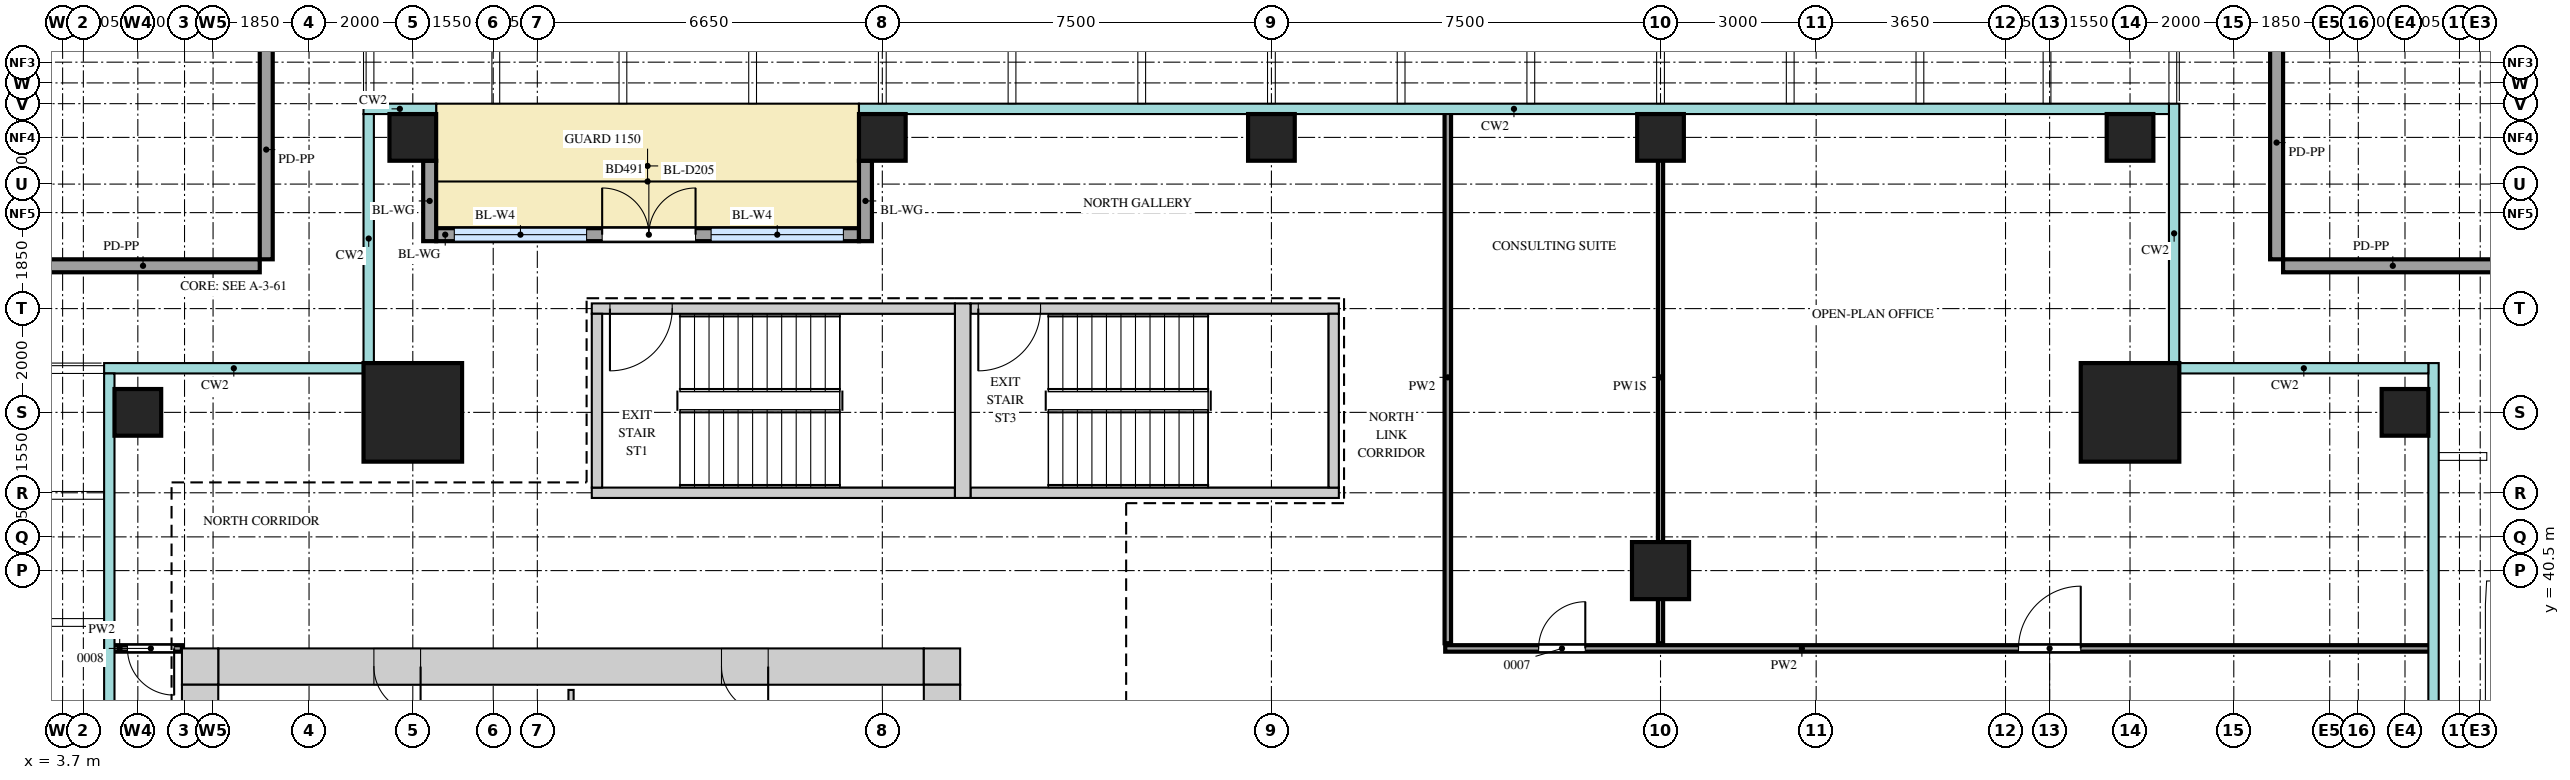
"""IFC4 building model, lengths in metres.
Left out: names, types, materials, properties, quantities, classifications, styles, units other than length and angle.
Written with IfcOpenShell. Run it as: python <this file> out.ifc"""

import sys

from ifc_helpers import new_model, si_unit, direction, frame, frame_2d, origin, origin_2d, place, context, subcontext, project, spatial, rectangle, extrude, source, transform, mapped, element, fill, save


model = new_model("IFC4")
c1 = context("Model", 3, precision=1e-05, world=origin(), true_north=direction((0.0, 1.0)))
c2 = subcontext(c1, "Body", "Model", "MODEL_VIEW")
j1 = project(units=[si_unit("LENGTHUNIT", "METRE"), si_unit("PLANEANGLEUNIT", "RADIAN")], contexts=[c1])
p1 = place(None, origin())
s1 = spatial("IfcSite", under=j1, at=p1, CompositionType="ELEMENT")
p2 = place(p1, origin())
s2 = spatial("IfcBuilding", under=s1, at=p2, CompositionType="ELEMENT")
p3 = place(p2, frame((0.0, 0.0, 222.2)))
s3 = spatial("IfcBuildingStorey", under=s2, at=p3, CompositionType="ELEMENT", Elevation=222.2)
m1 = source(origin(), c2, "Body", "SweptSolid", [
    extrude(rectangle(XDim=13.6, YDim=0.7, at=frame_2d((6.8, 0.0))), origin(), (0.0, 0.0, 1.0), 3.75),
])
p4 = place(p3, frame((6.7, 38.65, 0.0), z_axis=(0.0, 0.0, 1.0), x_axis=(1.0, 0.0, 0.0)))
e1 = element("IfcWall", 1, at=p4, inside=s3, PredefinedType="SHEAR", context=c2, shape_type="MappedRepresentation", body=[
    mapped(m1, transform((0.0, 0.0, 0.0))),
])
m2 = source(origin(), c2, "Body", "SweptSolid", [
    extrude(rectangle(XDim=0.9, YDim=2.1, at=frame_2d((0.45, 1.05))), frame((0.0, 0.36, 0.0), z_axis=(0.0, -1.0, 0.0), x_axis=(1.0, 0.0, 0.0)), (0.0, 0.0, 1.0), 0.72),
])
p5 = place(p4, frame((3.0, 0.0, 0.0)))
e2 = element("IfcOpeningElement", 2, at=p5, cuts=e1, PredefinedType="OPENING", context=c2, shape_type="MappedRepresentation", body=[
    mapped(m2, transform((0.0, 0.0, 0.0))),
])
p6 = place(p4, frame((9.7, 0.0, 0.0)))
e3 = element("IfcOpeningElement", 3, at=p6, cuts=e1, PredefinedType="OPENING", context=c2, shape_type="MappedRepresentation", body=[
    mapped(m2, transform((0.0, 0.0, 0.0))),
])
m3 = source(origin(), c2, "Body", "SweptSolid", [
    extrude(rectangle(XDim=0.7, YDim=0.7, at=frame_2d((0.35, 0.0))), origin(), (0.0, 0.0, 1.0), 3.75),
])
for number, where, z_axis, x_axis in (
    (4, (20.3, 38.65, 0.0), (0.0, 0.0, 1.0), (1.0, 0.0, 0.0)),
    (5, (6.0, 38.65, 0.0), (0.0, 0.0, 1.0), (1.0, 0.0, 0.0)),
):
    element("IfcWall", number, at=place(p3, frame(where, z_axis=z_axis, x_axis=x_axis)), inside=s3, PredefinedType="SHEAR", context=c2, shape_type="MappedRepresentation", body=[
        mapped(m3, transform((0.0, 0.0, 0.0))),
    ])
m4 = source(origin(), c2, "Body", "SweptSolid", [
    extrude(rectangle(XDim=22.6, YDim=0.7, at=frame_2d((11.3, 0.0))), origin(), (0.0, 0.0, 1.0), 3.75),
])
p7 = place(p3, frame((20.65, 15.7, 0.0), z_axis=(0.0, 0.0, 1.0), x_axis=(0.0, 1.0, 0.0)))
e6 = element("IfcWall", 6, at=p7, inside=s3, PredefinedType="SHEAR", context=c2, shape_type="MappedRepresentation", body=[
    mapped(m4, transform((0.0, 0.0, 0.0))),
])
m5 = source(origin(), c2, "Body", "SweptSolid", [
    extrude(rectangle(XDim=1.8, YDim=2.1, at=frame_2d((0.9, 1.05))), frame((0.0, 0.36, 0.0), z_axis=(0.0, -1.0, 0.0), x_axis=(1.0, 0.0, 0.0)), (0.0, 0.0, 1.0), 0.72),
])
p8 = place(p7, frame((10.8, 0.0, 0.0)))
e7 = element("IfcOpeningElement", 7, at=p8, cuts=e6, PredefinedType="OPENING", context=c2, shape_type="MappedRepresentation", body=[
    mapped(m5, transform((0.0, 0.0, 0.0))),
])
p9 = place(p7, frame((0.45, 0.0, 0.0)))
e8 = element("IfcOpeningElement", 8, at=p9, cuts=e6, PredefinedType="OPENING", context=c2, shape_type="MappedRepresentation", body=[
    mapped(m2, transform((0.0, 0.0, 0.0))),
])
p10 = place(p7, frame((2.9, 0.0, 0.0)))
e9 = element("IfcOpeningElement", 9, at=p10, cuts=e6, PredefinedType="OPENING", context=c2, shape_type="MappedRepresentation", body=[
    mapped(m2, transform((0.0, 0.0, 0.0))),
])
p11 = place(p7, frame((5.65, 0.0, 0.0)))
e10 = element("IfcOpeningElement", 10, at=p11, cuts=e6, PredefinedType="OPENING", context=c2, shape_type="MappedRepresentation", body=[
    mapped(m2, transform((0.0, 0.0, 0.0))),
])
p12 = place(p3, frame((6.35, 15.7, 0.0), z_axis=(0.0, 0.0, 1.0), x_axis=(0.0, 1.0, 0.0)))
e11 = element("IfcWall", 11, at=p12, inside=s3, PredefinedType="SHEAR", context=c2, shape_type="MappedRepresentation", body=[
    mapped(m4, transform((0.0, 0.0, 0.0))),
])
m6 = source(origin(), c2, "Body", "SweptSolid", [
    extrude(rectangle(XDim=7.0, YDim=0.2, at=frame_2d((3.5, 0.0))), origin(), (0.0, 0.0, 1.0), 3.75),
])
p13 = place(p3, frame((13.9, 45.55, 0.0), z_axis=(0.0, 0.0, 1.0), x_axis=(1.0, 0.0, 0.0)))
e12 = element("IfcWall", 12, at=p13, inside=s3, PredefinedType="SHEAR", context=c2, shape_type="MappedRepresentation", body=[
    mapped(m6, transform((0.0, 0.0, 0.0))),
])
m7 = source(origin(), c2, "Body", "SweptSolid", [
    extrude(rectangle(XDim=1.2, YDim=2.1, at=frame_2d((0.6, 1.05))), frame((0.0, 0.11, 0.0), z_axis=(0.0, -1.0, 0.0), x_axis=(1.0, 0.0, 0.0)), (0.0, 0.0, 1.0), 0.22),
])
p14 = place(p13, frame((0.35, 0.0, 0.0)))
e13 = element("IfcOpeningElement", 13, at=p14, cuts=e12, PredefinedType="OPENING", context=c2, shape_type="MappedRepresentation", body=[
    mapped(m7, transform((0.0, 0.0, 0.0))),
])
p15 = place(p3, frame((13.9, 42.0, 0.0), z_axis=(0.0, 0.0, 1.0), x_axis=(1.0, 0.0, 0.0)))
e14 = element("IfcWall", 14, at=p15, inside=s3, PredefinedType="SHEAR", context=c2, shape_type="MappedRepresentation", body=[
    mapped(m6, transform((0.0, 0.0, 0.0))),
])
m8 = source(origin(), c2, "Body", "SweptSolid", [
    extrude(rectangle(XDim=7.1, YDim=0.2, at=frame_2d((3.55, 0.0))), origin(), (0.0, 0.0, 1.0), 3.75),
])
p16 = place(p3, frame((21.2, 45.55, 0.0), z_axis=(0.0, 0.0, 1.0), x_axis=(1.0, 0.0, 0.0)))
e15 = element("IfcWall", 15, at=p16, inside=s3, PredefinedType="SHEAR", context=c2, shape_type="MappedRepresentation", body=[
    mapped(m8, transform((0.0, 0.0, 0.0))),
])
p17 = place(p16, frame((0.15, 0.0, 0.0)))
e16 = element("IfcOpeningElement", 16, at=p17, cuts=e15, PredefinedType="OPENING", context=c2, shape_type="MappedRepresentation", body=[
    mapped(m7, transform((0.0, 0.0, 0.0))),
])
p18 = place(p3, frame((21.2, 42.0, 0.0), z_axis=(0.0, 0.0, 1.0), x_axis=(1.0, 0.0, 0.0)))
e17 = element("IfcWall", 17, at=p18, inside=s3, PredefinedType="SHEAR", context=c2, shape_type="MappedRepresentation", body=[
    mapped(m8, transform((0.0, 0.0, 0.0))),
])
m9 = source(origin(), c2, "Body", "SweptSolid", [
    extrude(rectangle(XDim=3.75, YDim=0.3, at=frame_2d((1.875, 0.0))), origin(), (0.0, 0.0, 1.0), 3.75),
])
p19 = place(p3, frame((21.05, 41.9, 0.0), z_axis=(0.0, 0.0, 1.0), x_axis=(0.0, 1.0, 0.0)))
e18 = element("IfcWall", 18, at=p19, inside=s3, PredefinedType="SHEAR", context=c2, shape_type="MappedRepresentation", body=[
    mapped(m9, transform((0.0, 0.0, 0.0))),
])
m10 = source(origin(), c2, "Body", "SweptSolid", [
    extrude(rectangle(XDim=3.35, YDim=0.2, at=frame_2d((1.675, 0.0))), origin(), (0.0, 0.0, 1.0), 3.75),
])
for number, where, z_axis, x_axis in (
    (19, (14.0, 42.1, 0.0), (0.0, 0.0, 1.0), (0.0, 1.0, 0.0)),
    (20, (28.2, 42.1, 0.0), (0.0, 0.0, 1.0), (0.0, 1.0, 0.0)),
):
    element("IfcWall", number, at=place(p3, frame(where, z_axis=z_axis, x_axis=x_axis)), inside=s3, PredefinedType="SHEAR", context=c2, shape_type="MappedRepresentation", body=[
        mapped(m10, transform((0.0, 0.0, 0.0))),
    ])
m11 = source(origin(), c2, "Body", "SweptSolid", [
    extrude(rectangle(XDim=1.9, YDim=1.9, at=origin_2d()), origin(), (0.0, 0.0, 1.0), 4.0),
])
for number, where, z_axis, x_axis in (
    (21, (43.55, 43.55, 0.0), (0.0, 0.0, 1.0), (1.0, 0.0, 0.0)),
    (22, (10.45, 43.55, 0.0), (0.0, 0.0, 1.0), (1.0, 0.0, 0.0)),
):
    element("IfcColumn", number, at=place(p3, frame(where, z_axis=z_axis, x_axis=x_axis)), inside=s3, PredefinedType="COLUMN", context=c2, shape_type="MappedRepresentation", body=[
        mapped(m11, transform((0.0, 0.0, 0.0))),
    ])
m12 = source(origin(), c2, "Body", "SweptSolid", [
    extrude(rectangle(XDim=0.9, YDim=0.9, at=origin_2d()), origin(), (0.0, 0.0, 1.0), 3.75),
])
for number, where, z_axis, x_axis in (
    (23, (48.85, 43.55, 0.0), (0.0, 0.0, 1.0), (1.0, 0.0, 0.0)),
    (24, (10.45, 48.85, 0.0), (0.0, 0.0, 1.0), (1.0, 0.0, 0.0)),
    (25, (19.5, 48.85, 0.0), (0.0, 0.0, 1.0), (1.0, 0.0, 0.0)),
    (26, (27.0, 48.85, 0.0), (0.0, 0.0, 1.0), (1.0, 0.0, 0.0)),
    (27, (34.5, 48.85, 0.0), (0.0, 0.0, 1.0), (1.0, 0.0, 0.0)),
    (28, (43.55, 48.85, 0.0), (0.0, 0.0, 1.0), (1.0, 0.0, 0.0)),
    (29, (5.15, 43.55, 0.0), (0.0, 0.0, 1.0), (1.0, 0.0, 0.0)),
):
    element("IfcColumn", number, at=place(p3, frame(where, z_axis=z_axis, x_axis=x_axis)), inside=s3, PredefinedType="COLUMN", context=c2, shape_type="MappedRepresentation", body=[
        mapped(m12, transform((0.0, 0.0, 0.0))),
    ])
m13 = source(origin(), c2, "Body", "SweptSolid", [
    extrude(rectangle(XDim=1.1, YDim=1.1, at=origin_2d()), origin(), (0.0, 0.0, 1.0), 3.75),
])
p20 = place(p3, frame((34.5, 40.5, 0.0), z_axis=(0.0, 0.0, 1.0), x_axis=(1.0, 0.0, 0.0)))
e30 = element("IfcColumn", 30, at=p20, inside=s3, PredefinedType="COLUMN", context=c2, shape_type="MappedRepresentation", body=[
    mapped(m13, transform((0.0, 0.0, 0.0))),
])
m14 = source(origin(), c2, "Body", "SweptSolid", [
    extrude(rectangle(XDim=8.15, YDim=0.25, at=frame_2d((4.075, 0.0))), origin(), (0.0, 0.0, 1.0), 3.35),
])
p21 = place(p3, frame((10.9, 46.975, 0.0), z_axis=(0.0, 0.0, 1.0), x_axis=(1.0, 0.0, 0.0)))
e31 = element("IfcWall", 31, at=p21, inside=s3, PredefinedType="SOLIDWALL", context=c2, shape_type="MappedRepresentation", body=[
    mapped(m14, transform((0.0, 0.0, 0.0))),
])
m15 = source(origin(), c2, "Body", "SweptSolid", [
    extrude(rectangle(XDim=2.55, YDim=2.4, at=frame_2d((1.275, 1.2))), frame((0.0, 0.135, 0.0), z_axis=(0.0, -1.0, 0.0), x_axis=(1.0, 0.0, 0.0)), (0.0, 0.0, 1.0), 0.27),
])
p22 = place(p21, frame((0.35, 0.0, 0.0)))
e32 = element("IfcOpeningElement", 32, at=p22, cuts=e31, PredefinedType="OPENING", context=c2, shape_type="MappedRepresentation", body=[
    mapped(m15, transform((0.0, 0.0, 0.0))),
])
p23 = place(p21, frame((5.3, 0.0, 0.0)))
e33 = element("IfcOpeningElement", 33, at=p23, cuts=e31, PredefinedType="OPENING", context=c2, shape_type="MappedRepresentation", body=[
    mapped(m15, transform((0.0, 0.0, 0.0))),
])
m16 = source(origin(), c2, "Body", "SweptSolid", [
    extrude(rectangle(XDim=1.8, YDim=2.4, at=frame_2d((0.9, 1.2))), frame((0.0, 0.135, 0.0), z_axis=(0.0, -1.0, 0.0), x_axis=(1.0, 0.0, 0.0)), (0.0, 0.0, 1.0), 0.27),
])
p24 = place(p21, frame((3.2, 0.0, 0.0)))
e34 = element("IfcOpeningElement", 34, at=p24, cuts=e31, PredefinedType="OPENING", context=c2, shape_type="MappedRepresentation", body=[
    mapped(m16, transform((0.0, 0.0, 0.0))),
])
m17 = source(origin(), c2, "Body", "SweptSolid", [
    extrude(rectangle(XDim=1.55, YDim=0.25, at=frame_2d((0.775, 0.0))), origin(), (0.0, 0.0, 1.0), 3.35),
])
for number, where, z_axis, x_axis in (
    (35, (10.775, 48.4, 0.0), (0.0, 0.0, 1.0), (0.0, -1.0, 0.0)),
    (36, (19.175, 48.4, 0.0), (0.0, 0.0, 1.0), (0.0, -1.0, 0.0)),
):
    element("IfcWall", number, at=place(p3, frame(where, z_axis=z_axis, x_axis=x_axis)), inside=s3, PredefinedType="SOLIDWALL", context=c2, shape_type="MappedRepresentation", body=[
        mapped(m17, transform((0.0, 0.0, 0.0))),
    ])
m18 = source(origin(), c2, "Body", "SweptSolid", [
    extrude(rectangle(XDim=4.23, YDim=0.25, at=frame_2d((2.115, 0.0))), origin(), (0.0, 0.0, 1.0), 1.1),
])
p25 = place(p3, frame((50.73, 46.375, 0.0), z_axis=(0.0, 0.0, 1.0), x_axis=(-1.0, 0.0, 0.0)))
e37 = element("IfcWall", 37, at=p25, inside=s3, PredefinedType="SOLIDWALL", context=c2, shape_type="MappedRepresentation", body=[
    mapped(m18, transform((0.0, 0.0, 0.0))),
])
m19 = source(origin(), c2, "Body", "SweptSolid", [
    extrude(rectangle(XDim=4.5, YDim=0.25, at=frame_2d((2.25, 0.0))), origin(), (0.0, 0.0, 1.0), 1.1),
])
p26 = place(p3, frame((46.375, 46.5, 0.0), z_axis=(0.0, 0.0, 1.0), x_axis=(0.0, 1.0, 0.0)))
e38 = element("IfcWall", 38, at=p26, inside=s3, PredefinedType="SOLIDWALL", context=c2, shape_type="MappedRepresentation", body=[
    mapped(m19, transform((0.0, 0.0, 0.0))),
])
p27 = place(p3, frame((7.625, 50.73, 0.0), z_axis=(0.0, 0.0, 1.0), x_axis=(0.0, -1.0, 0.0)))
e39 = element("IfcWall", 39, at=p27, inside=s3, PredefinedType="SOLIDWALL", context=c2, shape_type="MappedRepresentation", body=[
    mapped(m18, transform((0.0, 0.0, 0.0))),
])
p28 = place(p3, frame((7.5, 46.375, 0.0), z_axis=(0.0, 0.0, 1.0), x_axis=(-1.0, 0.0, 0.0)))
e40 = element("IfcWall", 40, at=p28, inside=s3, PredefinedType="SOLIDWALL", context=c2, shape_type="MappedRepresentation", body=[
    mapped(m19, transform((0.0, 0.0, 0.0))),
])
m20 = source(origin(), c2, "Body", "SweptSolid", [
    extrude(rectangle(XDim=6.0, YDim=0.1, at=frame_2d((3.0, 0.0))), origin(), (0.0, 0.0, 1.0), 3.8),
])
p29 = place(p3, frame((13.5, 32.2, 0.0), z_axis=(0.0, 0.0, 1.0), x_axis=(0.0, 1.0, 0.0)))
e41 = element("IfcWall", 41, at=p29, inside=s3, PredefinedType="PARTITIONING", context=c2, shape_type="MappedRepresentation", body=[
    mapped(m20, transform((0.0, 0.0, 0.0))),
])
m21 = source(origin(), c2, "Body", "SweptSolid", [
    extrude(rectangle(XDim=1.35, YDim=0.125, at=frame_2d((0.675, 0.0))), origin(), (0.0, 0.0, 1.0), 3.8),
])
p30 = place(p3, frame((4.65, 39.0, 0.0), z_axis=(0.0, 0.0, 1.0), x_axis=(1.0, 0.0, 0.0)))
e42 = element("IfcWall", 42, at=p30, inside=s3, PredefinedType="PARTITIONING", context=c2, shape_type="MappedRepresentation", body=[
    mapped(m21, transform((0.0, 0.0, 0.0))),
])
m22 = source(origin(), c2, "Body", "SweptSolid", [
    extrude(rectangle(XDim=0.9, YDim=2.1, at=frame_2d((0.45, 1.05))), frame((0.0, 0.073, 0.0), z_axis=(0.0, -1.0, 0.0), x_axis=(1.0, 0.0, 0.0)), (0.0, 0.0, 1.0), 0.145),
])
p31 = place(p30, frame((0.3, 0.0, 0.0)))
e43 = element("IfcOpeningElement", 43, at=p31, cuts=e42, PredefinedType="OPENING", context=c2, shape_type="MappedRepresentation", body=[
    mapped(m22, transform((0.0, 0.0, 0.0))),
])
m23 = source(origin(), c2, "Body", "SweptSolid", [
    extrude(rectangle(XDim=19.0, YDim=0.125, at=frame_2d((9.5, 0.0))), origin(), (0.0, 0.0, 1.0), 3.8),
])
p32 = place(p3, frame((30.35, 39.0, 0.0), z_axis=(0.0, 0.0, 1.0), x_axis=(1.0, 0.0, 0.0)))
e44 = element("IfcWall", 44, at=p32, inside=s3, PredefinedType="PARTITIONING", context=c2, shape_type="MappedRepresentation", body=[
    mapped(m23, transform((0.0, 0.0, 0.0))),
])
p33 = place(p32, frame((1.8, 0.0, 0.0)))
e45 = element("IfcOpeningElement", 45, at=p33, cuts=e44, PredefinedType="OPENING", context=c2, shape_type="MappedRepresentation", body=[
    mapped(m22, transform((0.0, 0.0, 0.0))),
])
m24 = source(origin(), c2, "Body", "SweptSolid", [
    extrude(rectangle(XDim=1.2, YDim=2.1, at=frame_2d((0.6, 1.05))), frame((0.0, 0.073, 0.0), z_axis=(0.0, -1.0, 0.0), x_axis=(1.0, 0.0, 0.0)), (0.0, 0.0, 1.0), 0.145),
])
p34 = place(p32, frame((11.05, 0.0, 0.0)))
e46 = element("IfcOpeningElement", 46, at=p34, cuts=e44, PredefinedType="OPENING", context=c2, shape_type="MappedRepresentation", body=[
    mapped(m24, transform((0.0, 0.0, 0.0))),
])
m25 = source(origin(), c2, "Body", "SweptSolid", [
    extrude(rectangle(XDim=10.25, YDim=0.125, at=frame_2d((5.125, 0.0))), origin(), (0.0, 0.0, 1.0), 3.8),
])
p35 = place(p3, frame((30.4, 39.1, 0.0), z_axis=(0.0, 0.0, 1.0), x_axis=(0.0, 1.0, 0.0)))
e47 = element("IfcWall", 47, at=p35, inside=s3, PredefinedType="PARTITIONING", context=c2, shape_type="MappedRepresentation", body=[
    mapped(m25, transform((0.0, 0.0, 0.0))),
])
m26 = source(origin(), c2, "Body", "SweptSolid", [
    extrude(rectangle(XDim=10.25, YDim=0.1, at=frame_2d((5.125, 0.0))), origin(), (0.0, 0.0, 1.0), 3.35),
])
p36 = place(p3, frame((34.5, 39.1, 0.0), z_axis=(0.0, 0.0, 1.0), x_axis=(0.0, 1.0, 0.0)))
e48 = element("IfcWall", 48, at=p36, inside=s3, PredefinedType="PARTITIONING", context=c2, shape_type="MappedRepresentation", body=[
    mapped(m26, transform((0.0, 0.0, 0.0))),
])
m27 = source(origin(), c2, "Body", "SweptSolid", [
    extrude(rectangle(XDim=2.55, YDim=2.4, at=frame_2d((1.275, 1.2))), frame((0.0, 0.03, 0.0), z_axis=(0.0, -1.0, 0.0), x_axis=(1.0, 0.0, 0.0)), (0.0, 0.0, 1.0), 0.06),
])
p37 = place(p22, origin())
e49 = element("IfcWindow", 49, at=p37, inside=s3, PartitioningType="SINGLE_PANEL", PredefinedType="WINDOW", context=c2, shape_type="MappedRepresentation", body=[
    mapped(m27, transform((0.0, 0.0, 0.0))),
])
fill(e32, e49)
p38 = place(p23, origin())
e50 = element("IfcWindow", 50, at=p38, inside=s3, PartitioningType="SINGLE_PANEL", PredefinedType="WINDOW", context=c2, shape_type="MappedRepresentation", body=[
    mapped(m27, transform((0.0, 0.0, 0.0))),
])
fill(e33, e50)
m28 = source(origin(), c2, "Body", "SweptSolid", [
    extrude(rectangle(XDim=1.8, YDim=2.4, at=frame_2d((0.9, 1.2))), frame((0.0, 0.025, 0.0), z_axis=(0.0, -1.0, 0.0), x_axis=(1.0, 0.0, 0.0)), (0.0, 0.0, 1.0), 0.05),
])
p39 = place(p24, origin())
e51 = element("IfcDoor", 51, at=p39, inside=s3, OperationType="DOUBLE_DOOR_DOUBLE_SWING", PredefinedType="DOOR", context=c2, shape_type="MappedRepresentation", body=[
    mapped(m28, transform((0.0, 0.0, 0.0))),
])
fill(e34, e51)
m29 = source(origin(), c2, "Body", "SweptSolid", [
    extrude(rectangle(XDim=0.9, YDim=2.1, at=frame_2d((0.45, 1.05))), frame((0.0, 0.3, 0.0), z_axis=(0.0, -1.0, 0.0), x_axis=(1.0, 0.0, 0.0)), (0.0, 0.0, 1.0), 0.6),
])
p40 = place(p5, origin())
e52 = element("IfcDoor", 52, at=p40, inside=s3, OperationType="SINGLE_SWING_RIGHT", PredefinedType="DOOR", context=c2, shape_type="MappedRepresentation", body=[
    mapped(m29, transform((0.0, 0.0, 0.0))),
])
fill(e2, e52)
p41 = place(p6, origin())
e53 = element("IfcDoor", 53, at=p41, inside=s3, OperationType="SINGLE_SWING_RIGHT", PredefinedType="DOOR", context=c2, shape_type="MappedRepresentation", body=[
    mapped(m29, transform((0.0, 0.0, 0.0))),
])
fill(e3, e53)
m30 = source(origin(), c2, "Body", "SweptSolid", [
    extrude(rectangle(XDim=0.9, YDim=2.1, at=frame_2d((0.45, 1.05))), frame((0.0, 0.025, 0.0), z_axis=(0.0, -1.0, 0.0), x_axis=(1.0, 0.0, 0.0)), (0.0, 0.0, 1.0), 0.05),
])
p42 = place(p31, origin())
e54 = element("IfcDoor", 54, at=p42, inside=s3, OperationType="SINGLE_SWING_RIGHT", PredefinedType="DOOR", context=c2, shape_type="MappedRepresentation", body=[
    mapped(m30, transform((0.0, 0.0, 0.0))),
])
fill(e43, e54)
p43 = place(p33, origin())
e55 = element("IfcDoor", 55, at=p43, inside=s3, OperationType="SINGLE_SWING_LEFT", PredefinedType="DOOR", context=c2, shape_type="MappedRepresentation", body=[
    mapped(m30, transform((0.0, 0.0, 0.0))),
])
fill(e45, e55)
m31 = source(origin(), c2, "Body", "SweptSolid", [
    extrude(rectangle(XDim=1.2, YDim=2.1, at=frame_2d((0.6, 1.05))), frame((0.0, 0.025, 0.0), z_axis=(0.0, -1.0, 0.0), x_axis=(1.0, 0.0, 0.0)), (0.0, 0.0, 1.0), 0.05),
])
p44 = place(p34, origin())
e56 = element("IfcDoor", 56, at=p44, inside=s3, OperationType="SINGLE_SWING_LEFT", PredefinedType="DOOR", context=c2, shape_type="MappedRepresentation", body=[
    mapped(m31, transform((0.0, 0.0, 0.0))),
])
fill(e46, e56)
p45 = place(p14, origin())
e57 = element("IfcDoor", 57, at=p45, inside=s3, OperationType="SINGLE_SWING_LEFT", PredefinedType="DOOR", context=c2, shape_type="MappedRepresentation", body=[
    mapped(m31, transform((0.0, 0.0, 0.0))),
])
fill(e13, e57)
p46 = place(p17, origin())
e58 = element("IfcDoor", 58, at=p46, inside=s3, OperationType="SINGLE_SWING_LEFT", PredefinedType="DOOR", context=c2, shape_type="MappedRepresentation", body=[
    mapped(m31, transform((0.0, 0.0, 0.0))),
])
fill(e16, e58)
save(model, sys.argv[1])
